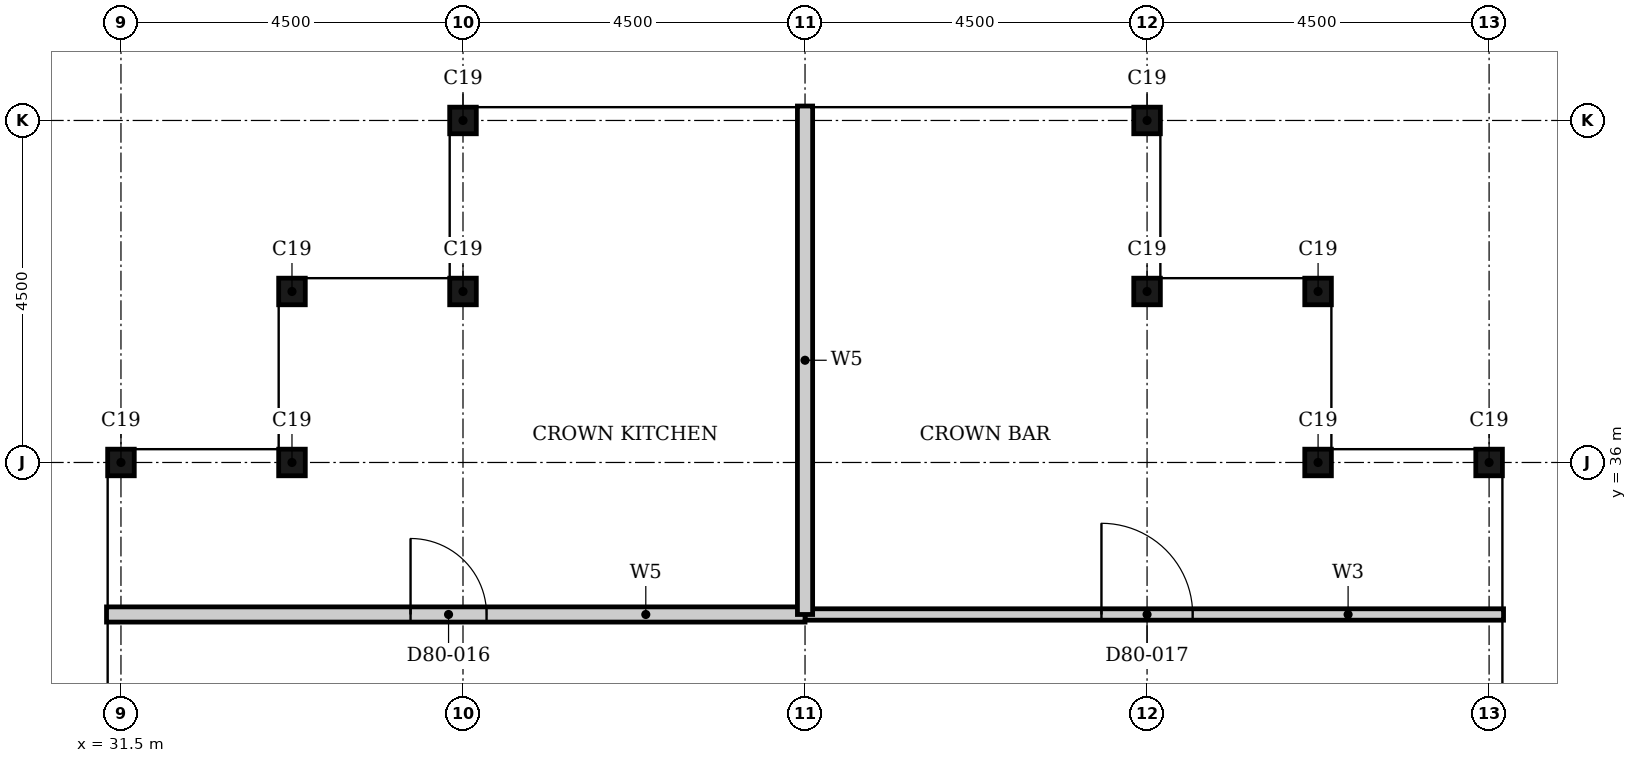
"""IFC4 building model, lengths in metres.
Left out: names, types, materials, properties, quantities, classifications, styles, units other than length and angle.
Written with IfcOpenShell. Run it as: python <this file> out.ifc"""

import sys

from ifc_helpers import new_model, si_unit, direction, frame, frame_2d, origin, origin_2d, place, context, subcontext, project, spatial, rectangle, i_section, extrude, element, fill, save


model = new_model("IFC4")
c1 = context("Model", 3, precision=1e-05, world=origin(), true_north=direction((0.0, 1.0)))
c2 = subcontext(c1, "Body", "Model", "MODEL_VIEW")
j1 = project(units=[si_unit("LENGTHUNIT", "METRE"), si_unit("PLANEANGLEUNIT", "RADIAN")], contexts=[c1])
p1 = place(None, origin())
s1 = spatial("IfcSite", under=j1, at=p1, CompositionType="ELEMENT")
p2 = place(p1, origin())
s2 = spatial("IfcBuilding", under=s1, at=p2, CompositionType="ELEMENT")
p3 = place(p2, frame((0.0, 0.0, 317.0)))
s3 = spatial("IfcBuildingStorey", under=s2, at=p3, CompositionType="ELEMENT", Elevation=317.0)
for number, where, z_axis, x_axis in (
    (1, (49.5, 36.0, 0.0), (0.0, 0.0, 1.0), (1.0, 0.0, 0.0)),
    (2, (47.25, 36.0, 0.0), (0.0, 0.0, 1.0), (1.0, 0.0, 0.0)),
    (3, (47.25, 38.25, 0.0), (0.0, 0.0, 1.0), (1.0, 0.0, 0.0)),
    (4, (45.0, 38.25, 0.0), (0.0, 0.0, 1.0), (1.0, 0.0, 0.0)),
    (5, (45.0, 40.5, 0.0), (0.0, 0.0, 1.0), (1.0, 0.0, 0.0)),
    (6, (36.0, 40.5, 0.0), (0.0, 0.0, 1.0), (1.0, 0.0, 0.0)),
    (7, (36.0, 38.25, 0.0), (0.0, 0.0, 1.0), (1.0, 0.0, 0.0)),
    (8, (33.75, 38.25, 0.0), (0.0, 0.0, 1.0), (1.0, 0.0, 0.0)),
    (9, (33.75, 36.0, 0.0), (0.0, 0.0, 1.0), (1.0, 0.0, 0.0)),
    (10, (31.5, 36.0, 0.0), (0.0, 0.0, 1.0), (1.0, 0.0, 0.0)),
):
    element("IfcColumn", number, at=place(p3, frame(where, z_axis=z_axis, x_axis=x_axis)), inside=s3, PredefinedType="COLUMN", context=c2, shape_type="SweptSolid", body=[
        extrude(i_section(OverallWidth=0.35, OverallDepth=0.35, WebThickness=0.012, FlangeThickness=0.019, FilletRadius=0.013, at=origin_2d()), origin(), (0.0, 0.0, 1.0), 4.2),
    ])
p4 = place(p3, frame((40.5, 34.0, 0.0), z_axis=(0.0, 0.0, 1.0), x_axis=(1.0, 0.0, 0.0)))
e11 = element("IfcWall", 11, at=p4, inside=s3, PredefinedType="PARTITIONING", context=c2, shape_type="SweptSolid", body=[
    extrude(rectangle(XDim=9.19, YDim=0.15, at=frame_2d((4.595, 0.0))), origin(), (0.0, 0.0, 1.0), 3.9),
])
p5 = place(p4, frame((3.9, 0.0, 0.0)))
e12 = element("IfcOpeningElement", 12, at=p5, cuts=e11, PredefinedType="OPENING", context=c2, shape_type="SweptSolid", body=[
    extrude(rectangle(XDim=1.2, YDim=2.4, at=frame_2d((0.6, 1.2))), frame((0.0, 0.085, 0.0), z_axis=(0.0, -1.0, 0.0), x_axis=(1.0, 0.0, 0.0)), (0.0, 0.0, 1.0), 0.17),
])
p6 = place(p3, frame((31.31, 34.0, 0.0), z_axis=(0.0, 0.0, 1.0), x_axis=(1.0, 0.0, 0.0)))
e13 = element("IfcWall", 13, at=p6, inside=s3, PredefinedType="PARTITIONING", context=c2, shape_type="SweptSolid", body=[
    extrude(rectangle(XDim=9.19, YDim=0.2, at=frame_2d((4.595, 0.0))), origin(), (0.0, 0.0, 1.0), 3.9),
])
p7 = place(p6, frame((4.0, 0.0, 0.0)))
e14 = element("IfcOpeningElement", 14, at=p7, cuts=e13, PredefinedType="OPENING", context=c2, shape_type="SweptSolid", body=[
    extrude(rectangle(XDim=1.0, YDim=2.1, at=frame_2d((0.5, 1.05))), frame((0.0, 0.11, 0.0), z_axis=(0.0, -1.0, 0.0), x_axis=(1.0, 0.0, 0.0)), (0.0, 0.0, 1.0), 0.22),
])
p8 = place(p3, frame((40.5, 34.0, 0.0), z_axis=(0.0, 0.0, 1.0), x_axis=(0.0, 1.0, 0.0)))
e15 = element("IfcWall", 15, at=p8, inside=s3, PredefinedType="PARTITIONING", context=c2, shape_type="SweptSolid", body=[
    extrude(rectangle(XDim=6.69, YDim=0.2, at=frame_2d((3.345, 0.0))), origin(), (0.0, 0.0, 1.0), 3.9),
])
p9 = place(p7, origin())
e16 = element("IfcDoor", 16, at=p9, inside=s3, OperationType="SINGLE_SWING_RIGHT", PredefinedType="DOOR", context=c2, shape_type="SweptSolid", body=[
    extrude(rectangle(XDim=1.0, YDim=2.1, at=frame_2d((0.5, 1.05))), frame((0.0, 0.025, 0.0), z_axis=(0.0, -1.0, 0.0), x_axis=(1.0, 0.0, 0.0)), (0.0, 0.0, 1.0), 0.05),
])
fill(e14, e16)
p10 = place(p5, origin())
e17 = element("IfcDoor", 17, at=p10, inside=s3, OperationType="SINGLE_SWING_RIGHT", PredefinedType="DOOR", context=c2, shape_type="SweptSolid", body=[
    extrude(rectangle(XDim=1.2, YDim=2.4, at=frame_2d((0.6, 1.2))), frame((0.0, 0.025, 0.0), z_axis=(0.0, -1.0, 0.0), x_axis=(1.0, 0.0, 0.0)), (0.0, 0.0, 1.0), 0.05),
])
fill(e12, e17)
save(model, sys.argv[1])
